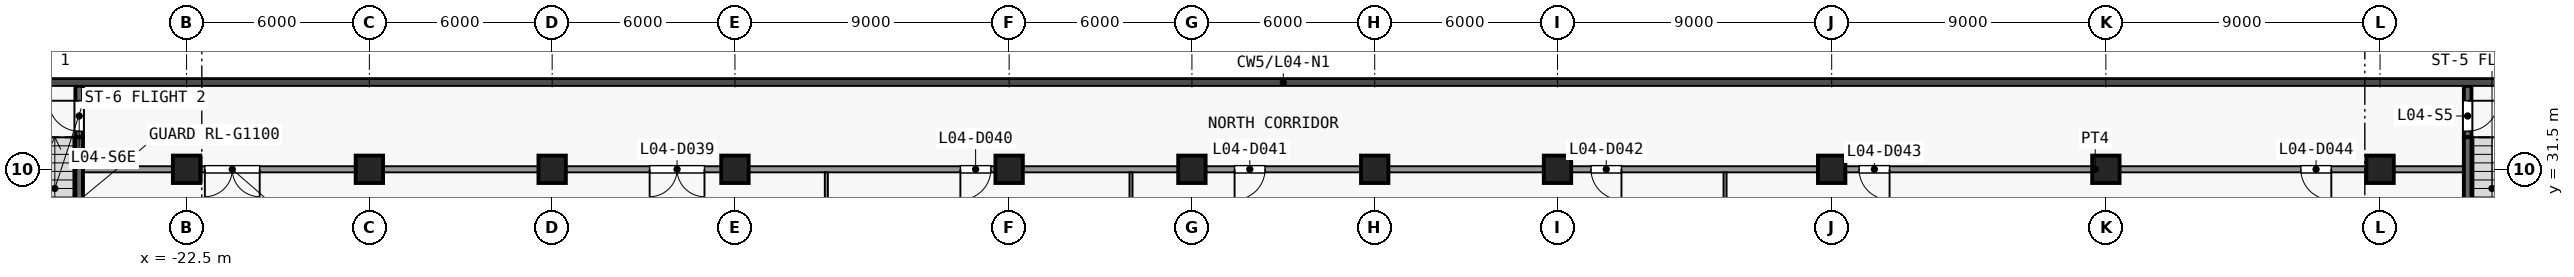
"""IFC4 building model, lengths in metres.
Left out: names, types, materials, properties, quantities, classifications, styles, units other than length and angle.
Written with IfcOpenShell. Run it as: python <this file> out.ifc"""

import sys

from ifc_helpers import new_model, si_unit, direction, frame, frame_2d, origin, origin_2d, place, context, subcontext, project, spatial, rectangle, extrude, element, fill, save


model = new_model("IFC4")
c1 = context("Model", 3, precision=1e-05, world=origin(), true_north=direction((0.0, 1.0)))
c2 = subcontext(c1, "Body", "Model", "MODEL_VIEW")
j1 = project(units=[si_unit("LENGTHUNIT", "METRE"), si_unit("PLANEANGLEUNIT", "RADIAN")], contexts=[c1])
p1 = place(None, origin())
s1 = spatial("IfcSite", under=j1, at=p1, CompositionType="ELEMENT")
p2 = place(p1, origin())
s2 = spatial("IfcBuilding", under=s1, at=p2, CompositionType="ELEMENT")
p3 = place(p2, frame((0.0, 0.0, 23.5)))
s3 = spatial("IfcBuildingStorey", under=s2, at=p3, CompositionType="ELEMENT", Elevation=23.5)
for number, where, z_axis, x_axis in (
    (1, (-22.5, 31.5, 0.0), (0.0, 0.0, 1.0), (1.0, 0.0, 0.0)),
    (2, (-16.5, 31.5, 0.0), (0.0, 0.0, 1.0), (1.0, 0.0, 0.0)),
    (3, (-10.5, 31.5, 0.0), (0.0, 0.0, 1.0), (1.0, 0.0, 0.0)),
    (4, (-4.5, 31.5, 0.0), (0.0, 0.0, 1.0), (1.0, 0.0, 0.0)),
    (5, (4.5, 31.5, 0.0), (0.0, 0.0, 1.0), (1.0, 0.0, 0.0)),
    (6, (10.5, 31.5, 0.0), (0.0, 0.0, 1.0), (1.0, 0.0, 0.0)),
    (7, (16.5, 31.5, 0.0), (0.0, 0.0, 1.0), (1.0, 0.0, 0.0)),
    (8, (22.5, 31.5, 0.0), (0.0, 0.0, 1.0), (1.0, 0.0, 0.0)),
    (9, (31.5, 31.5, 0.0), (0.0, 0.0, 1.0), (1.0, 0.0, 0.0)),
    (10, (40.5, 31.5, 0.0), (0.0, 0.0, 1.0), (1.0, 0.0, 0.0)),
    (11, (49.5, 31.5, 0.0), (0.0, 0.0, 1.0), (1.0, 0.0, 0.0)),
):
    element("IfcColumn", number, at=place(p3, frame(where, z_axis=z_axis, x_axis=x_axis)), inside=s3, PredefinedType="COLUMN", context=c2, shape_type="SweptSolid", body=[
        extrude(rectangle(XDim=0.9, YDim=0.9, at=origin_2d()), origin(), (0.0, 0.0, 1.0), 4.5),
    ])
p4 = place(p3, frame((52.375, 34.24, 0.0), z_axis=(0.0, 0.0, 1.0), x_axis=(0.0, -1.0, 0.0)))
e12 = element("IfcWall", 12, at=p4, inside=s3, PredefinedType="SHEAR", context=c2, shape_type="SweptSolid", body=[
    extrude(rectangle(XDim=1.69, YDim=0.25, at=frame_2d((0.845, 0.0))), origin(), (0.0, 0.0, 1.0), 4.15),
])
p5 = place(p4, frame((0.49, 0.0, 0.0)))
e13 = element("IfcOpeningElement", 13, at=p5, cuts=e12, PredefinedType="OPENING", context=c2, shape_type="SweptSolid", body=[
    extrude(rectangle(XDim=1.0, YDim=2.1, at=frame_2d((0.5, 1.05))), frame((0.0, 0.135, 0.0), z_axis=(0.0, -1.0, 0.0), x_axis=(1.0, 0.0, 0.0)), (0.0, 0.0, 1.0), 0.27),
])
p6 = place(p3, frame((52.375, 27.07, 0.0), z_axis=(0.0, 0.0, 1.0), x_axis=(0.0, 1.0, 0.0)))
e14 = element("IfcWall", 14, at=p6, inside=s3, PredefinedType="SHEAR", context=c2, shape_type="SweptSolid", body=[
    extrude(rectangle(XDim=5.48, YDim=0.25, at=frame_2d((2.74, 0.0))), origin(), (0.0, 0.0, 1.0), 4.15),
])
p7 = place(p3, frame((-26.025, 32.55, 0.0), z_axis=(0.0, 0.0, 1.0), x_axis=(0.0, 1.0, 0.0)))
e15 = element("IfcWall", 15, at=p7, inside=s3, PredefinedType="SHEAR", context=c2, shape_type="SweptSolid", body=[
    extrude(rectangle(XDim=1.69, YDim=0.25, at=frame_2d((0.845, 0.0))), origin(), (0.0, 0.0, 1.0), 4.15),
])
p8 = place(p7, frame((0.2, 0.0, 0.0)))
e16 = element("IfcOpeningElement", 16, at=p8, cuts=e15, PredefinedType="OPENING", context=c2, shape_type="SweptSolid", body=[
    extrude(rectangle(XDim=1.0, YDim=2.1, at=frame_2d((0.5, 1.05))), frame((0.0, 0.135, 0.0), z_axis=(0.0, -1.0, 0.0), x_axis=(1.0, 0.0, 0.0)), (0.0, 0.0, 1.0), 0.27),
])
p9 = place(p3, frame((-26.025, 27.07, 0.0), z_axis=(0.0, 0.0, 1.0), x_axis=(0.0, 1.0, 0.0)))
e17 = element("IfcWall", 17, at=p9, inside=s3, PredefinedType="SHEAR", context=c2, shape_type="SweptSolid", body=[
    extrude(rectangle(XDim=5.48, YDim=0.25, at=frame_2d((2.74, 0.0))), origin(), (0.0, 0.0, 1.0), 4.15),
])
p10 = place(p3, frame((-25.9, 31.5, 0.0), z_axis=(0.0, 0.0, 1.0), x_axis=(1.0, 0.0, 0.0)))
e18 = element("IfcWall", 18, at=p10, inside=s3, PredefinedType="PARTITIONING", context=c2, shape_type="SweptSolid", body=[
    extrude(rectangle(XDim=78.15, YDim=0.2, at=frame_2d((39.075, 0.0))), origin(), (0.0, 0.0, 1.0), 4.15),
])
p11 = place(p10, frame((4.0, 0.0, 0.0)))
e19 = element("IfcOpeningElement", 19, at=p11, cuts=e18, PredefinedType="OPENING", context=c2, shape_type="SweptSolid", body=[
    extrude(rectangle(XDim=1.8, YDim=2.1, at=frame_2d((0.9, 1.05))), frame((0.0, 0.11, 0.0), z_axis=(0.0, -1.0, 0.0), x_axis=(1.0, 0.0, 0.0)), (0.0, 0.0, 1.0), 0.22),
])
p12 = place(p10, frame((18.6, 0.0, 0.0)))
e20 = element("IfcOpeningElement", 20, at=p12, cuts=e18, PredefinedType="OPENING", context=c2, shape_type="SweptSolid", body=[
    extrude(rectangle(XDim=1.8, YDim=2.1, at=frame_2d((0.9, 1.05))), frame((0.0, 0.11, 0.0), z_axis=(0.0, -1.0, 0.0), x_axis=(1.0, 0.0, 0.0)), (0.0, 0.0, 1.0), 0.22),
])
p13 = place(p10, frame((28.8, 0.0, 0.0)))
e21 = element("IfcOpeningElement", 21, at=p13, cuts=e18, PredefinedType="OPENING", context=c2, shape_type="SweptSolid", body=[
    extrude(rectangle(XDim=1.0, YDim=2.1, at=frame_2d((0.5, 1.05))), frame((0.0, 0.11, 0.0), z_axis=(0.0, -1.0, 0.0), x_axis=(1.0, 0.0, 0.0)), (0.0, 0.0, 1.0), 0.22),
])
p14 = place(p10, frame((37.8, 0.0, 0.0)))
e22 = element("IfcOpeningElement", 22, at=p14, cuts=e18, PredefinedType="OPENING", context=c2, shape_type="SweptSolid", body=[
    extrude(rectangle(XDim=1.0, YDim=2.1, at=frame_2d((0.5, 1.05))), frame((0.0, 0.11, 0.0), z_axis=(0.0, -1.0, 0.0), x_axis=(1.0, 0.0, 0.0)), (0.0, 0.0, 1.0), 0.22),
])
p15 = place(p10, frame((49.5, 0.0, 0.0)))
e23 = element("IfcOpeningElement", 23, at=p15, cuts=e18, PredefinedType="OPENING", context=c2, shape_type="SweptSolid", body=[
    extrude(rectangle(XDim=1.0, YDim=2.1, at=frame_2d((0.5, 1.05))), frame((0.0, 0.11, 0.0), z_axis=(0.0, -1.0, 0.0), x_axis=(1.0, 0.0, 0.0)), (0.0, 0.0, 1.0), 0.22),
])
p16 = place(p10, frame((58.3, 0.0, 0.0)))
e24 = element("IfcOpeningElement", 24, at=p16, cuts=e18, PredefinedType="OPENING", context=c2, shape_type="SweptSolid", body=[
    extrude(rectangle(XDim=1.0, YDim=2.1, at=frame_2d((0.5, 1.05))), frame((0.0, 0.11, 0.0), z_axis=(0.0, -1.0, 0.0), x_axis=(1.0, 0.0, 0.0)), (0.0, 0.0, 1.0), 0.22),
])
p17 = place(p10, frame((72.8, 0.0, 0.0)))
e25 = element("IfcOpeningElement", 25, at=p17, cuts=e18, PredefinedType="OPENING", context=c2, shape_type="SweptSolid", body=[
    extrude(rectangle(XDim=1.0, YDim=2.1, at=frame_2d((0.5, 1.05))), frame((0.0, 0.11, 0.0), z_axis=(0.0, -1.0, 0.0), x_axis=(1.0, 0.0, 0.0)), (0.0, 0.0, 1.0), 0.22),
])
for number, where, z_axis, x_axis in (
    (26, (-1.5, 25.55, 0.0), (0.0, 0.0, 1.0), (0.0, 1.0, 0.0)),
    (27, (8.5, 25.55, 0.0), (0.0, 0.0, 1.0), (0.0, 1.0, 0.0)),
    (28, (28.0, 25.55, 0.0), (0.0, 0.0, 1.0), (0.0, 1.0, 0.0)),
):
    element("IfcWall", number, at=place(p3, frame(where, z_axis=z_axis, x_axis=x_axis)), inside=s3, PredefinedType="PARTITIONING", context=c2, shape_type="SweptSolid", body=[
        extrude(rectangle(XDim=5.85, YDim=0.1, at=frame_2d((2.925, 0.0))), origin(), (0.0, 0.0, 1.0), 4.15),
    ])
p18 = place(p5, origin())
e29 = element("IfcDoor", 29, at=p18, inside=s3, OperationType="SINGLE_SWING_LEFT", PredefinedType="DOOR", context=c2, shape_type="SweptSolid", body=[
    extrude(rectangle(XDim=1.0, YDim=2.1, at=frame_2d((0.5, 1.05))), frame((0.0, 0.025, 0.0), z_axis=(0.0, -1.0, 0.0), x_axis=(1.0, 0.0, 0.0)), (0.0, 0.0, 1.0), 0.05),
])
fill(e13, e29)
p19 = place(p8, origin())
e30 = element("IfcDoor", 30, at=p19, inside=s3, OperationType="SINGLE_SWING_RIGHT", PredefinedType="DOOR", context=c2, shape_type="SweptSolid", body=[
    extrude(rectangle(XDim=1.0, YDim=2.1, at=frame_2d((0.5, 1.05))), frame((0.0, 0.025, 0.0), z_axis=(0.0, -1.0, 0.0), x_axis=(1.0, 0.0, 0.0)), (0.0, 0.0, 1.0), 0.05),
])
fill(e16, e30)
p20 = place(p11, origin())
e31 = element("IfcDoor", 31, at=p20, inside=s3, OperationType="DOUBLE_DOOR_SINGLE_SWING", PredefinedType="DOOR", context=c2, shape_type="SweptSolid", body=[
    extrude(rectangle(XDim=1.8, YDim=2.1, at=frame_2d((0.9, 1.05))), frame((0.0, 0.025, 0.0), z_axis=(0.0, -1.0, 0.0), x_axis=(1.0, 0.0, 0.0)), (0.0, 0.0, 1.0), 0.05),
])
fill(e19, e31)
p21 = place(p12, origin())
e32 = element("IfcDoor", 32, at=p21, inside=s3, OperationType="DOUBLE_DOOR_SINGLE_SWING", PredefinedType="DOOR", context=c2, shape_type="SweptSolid", body=[
    extrude(rectangle(XDim=1.8, YDim=2.1, at=frame_2d((0.9, 1.05))), frame((0.0, 0.025, 0.0), z_axis=(0.0, -1.0, 0.0), x_axis=(1.0, 0.0, 0.0)), (0.0, 0.0, 1.0), 0.05),
])
fill(e20, e32)
p22 = place(p13, origin())
e33 = element("IfcDoor", 33, at=p22, inside=s3, OperationType="SINGLE_SWING_LEFT", PredefinedType="DOOR", context=c2, shape_type="SweptSolid", body=[
    extrude(rectangle(XDim=1.0, YDim=2.1, at=frame_2d((0.5, 1.05))), frame((0.0, 0.025, 0.0), z_axis=(0.0, -1.0, 0.0), x_axis=(1.0, 0.0, 0.0)), (0.0, 0.0, 1.0), 0.05),
])
fill(e21, e33)
p23 = place(p14, origin())
e34 = element("IfcDoor", 34, at=p23, inside=s3, OperationType="SINGLE_SWING_LEFT", PredefinedType="DOOR", context=c2, shape_type="SweptSolid", body=[
    extrude(rectangle(XDim=1.0, YDim=2.1, at=frame_2d((0.5, 1.05))), frame((0.0, 0.025, 0.0), z_axis=(0.0, -1.0, 0.0), x_axis=(1.0, 0.0, 0.0)), (0.0, 0.0, 1.0), 0.05),
])
fill(e22, e34)
p24 = place(p15, origin())
e35 = element("IfcDoor", 35, at=p24, inside=s3, OperationType="SINGLE_SWING_RIGHT", PredefinedType="DOOR", context=c2, shape_type="SweptSolid", body=[
    extrude(rectangle(XDim=1.0, YDim=2.1, at=frame_2d((0.5, 1.05))), frame((0.0, 0.025, 0.0), z_axis=(0.0, -1.0, 0.0), x_axis=(1.0, 0.0, 0.0)), (0.0, 0.0, 1.0), 0.05),
])
fill(e23, e35)
p25 = place(p16, origin())
e36 = element("IfcDoor", 36, at=p25, inside=s3, OperationType="SINGLE_SWING_RIGHT", PredefinedType="DOOR", context=c2, shape_type="SweptSolid", body=[
    extrude(rectangle(XDim=1.0, YDim=2.1, at=frame_2d((0.5, 1.05))), frame((0.0, 0.025, 0.0), z_axis=(0.0, -1.0, 0.0), x_axis=(1.0, 0.0, 0.0)), (0.0, 0.0, 1.0), 0.05),
])
fill(e24, e36)
p26 = place(p17, origin())
e37 = element("IfcDoor", 37, at=p26, inside=s3, OperationType="SINGLE_SWING_RIGHT", PredefinedType="DOOR", context=c2, shape_type="SweptSolid", body=[
    extrude(rectangle(XDim=1.0, YDim=2.1, at=frame_2d((0.5, 1.05))), frame((0.0, 0.025, 0.0), z_axis=(0.0, -1.0, 0.0), x_axis=(1.0, 0.0, 0.0)), (0.0, 0.0, 1.0), 0.05),
])
fill(e25, e37)
save(model, sys.argv[1])
